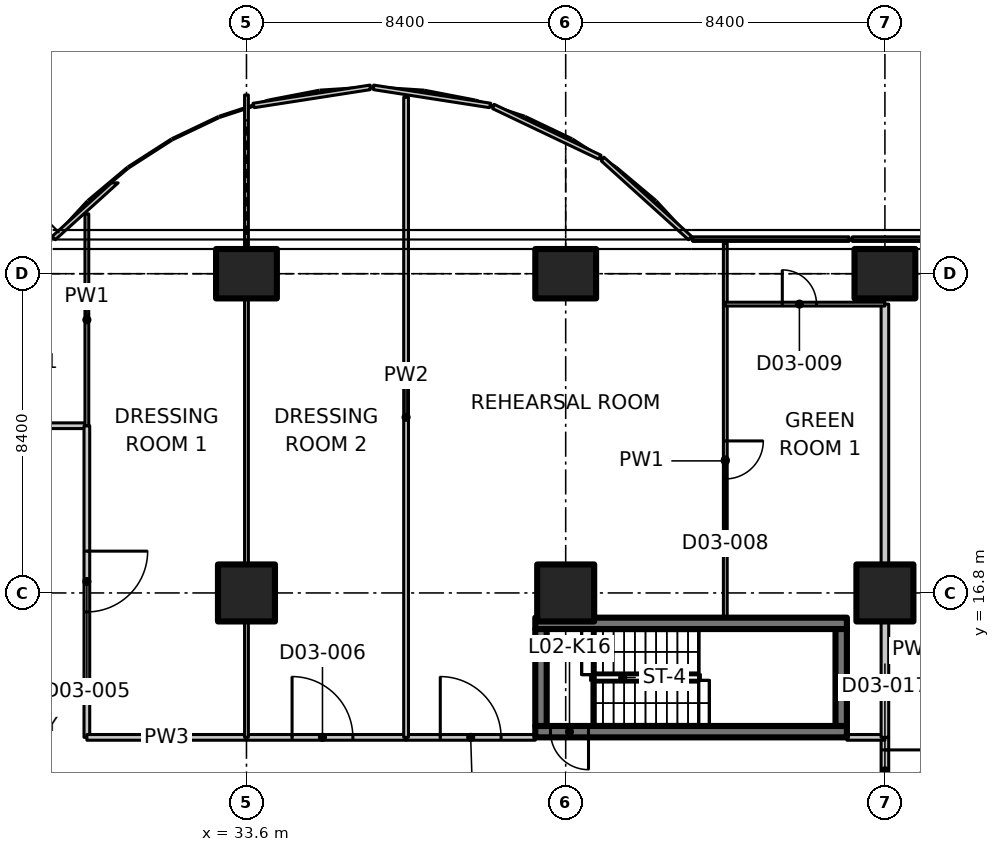
"""IFC4 building model, lengths in metres.
Left out: names, types, materials, properties, quantities, classifications, styles, units other than length and angle.
Written with IfcOpenShell. Run it as: python <this file> out.ifc"""

import sys

from ifc_helpers import new_model, si_unit, direction, frame, frame_2d, origin, origin_2d, place, context, subcontext, project, spatial, polyline, rectangle, outline, extrude, element, fill, save


model = new_model("IFC4")
c1 = context("Model", 3, precision=1e-05, world=origin(), true_north=direction((0.0, 1.0)))
c2 = subcontext(c1, "Body", "Model", "MODEL_VIEW")
j1 = project(units=[si_unit("LENGTHUNIT", "METRE"), si_unit("PLANEANGLEUNIT", "RADIAN")], contexts=[c1])
p1 = place(None, origin())
s1 = spatial("IfcSite", under=j1, at=p1, CompositionType="ELEMENT")
p2 = place(p1, origin())
s2 = spatial("IfcBuilding", under=s1, at=p2, CompositionType="ELEMENT")
p3 = place(p2, frame((0.0, 0.0, 12.5)))
s3 = spatial("IfcBuildingStorey", under=s2, at=p3, CompositionType="ELEMENT", Elevation=12.5)
p4 = place(p3, frame((33.6, 16.8, 0.0), z_axis=(0.0, 0.0, 1.0), x_axis=(1.0, 0.0, 0.0)))
e1 = element("IfcColumn", 1, at=p4, inside=s3, PredefinedType="COLUMN", context=c2, shape_type="SweptSolid", body=[
    extrude(rectangle(XDim=1.5, YDim=1.5, at=origin_2d()), origin(), (0.0, 0.0, 1.0), 7.25),
])
p5 = place(p3, frame((33.6, 25.2, 0.0), z_axis=(0.0, 0.0, 1.0), x_axis=(0.0, 1.0, 0.0)))
e2 = element("IfcColumn", 2, at=p5, inside=s3, PredefinedType="COLUMN", context=c2, shape_type="SweptSolid", body=[
    extrude(rectangle(XDim=1.3, YDim=1.6, at=origin_2d()), origin(), (0.0, 0.0, 1.0), 7.25),
])
p6 = place(p3, frame((42.0, 16.8, 0.0), z_axis=(0.0, 0.0, 1.0), x_axis=(1.0, 0.0, 0.0)))
e3 = element("IfcColumn", 3, at=p6, inside=s3, PredefinedType="COLUMN", context=c2, shape_type="SweptSolid", body=[
    extrude(rectangle(XDim=1.5, YDim=1.5, at=origin_2d()), origin(), (0.0, 0.0, 1.0), 7.25),
])
p7 = place(p3, frame((42.0, 25.2, 0.0), z_axis=(0.0, 0.0, 1.0), x_axis=(0.0, 1.0, 0.0)))
e4 = element("IfcColumn", 4, at=p7, inside=s3, PredefinedType="COLUMN", context=c2, shape_type="SweptSolid", body=[
    extrude(rectangle(XDim=1.3, YDim=1.6, at=origin_2d()), origin(), (0.0, 0.0, 1.0), 7.25),
])
p8 = place(p3, frame((50.4, 16.8, 0.0), z_axis=(0.0, 0.0, 1.0), x_axis=(1.0, 0.0, 0.0)))
e5 = element("IfcColumn", 5, at=p8, inside=s3, PredefinedType="COLUMN", context=c2, shape_type="SweptSolid", body=[
    extrude(rectangle(XDim=1.5, YDim=1.5, at=origin_2d()), origin(), (0.0, 0.0, 1.0), 7.25),
])
p9 = place(p3, frame((50.4, 25.2, 0.0), z_axis=(0.0, 0.0, 1.0), x_axis=(0.0, 1.0, 0.0)))
e6 = element("IfcColumn", 6, at=p9, inside=s3, PredefinedType="COLUMN", context=c2, shape_type="SweptSolid", body=[
    extrude(rectangle(XDim=1.3, YDim=1.6, at=origin_2d()), origin(), (0.0, 0.0, 1.0), 7.25),
])
p10 = place(p3, origin())
e7 = element("IfcWall", 7, at=p10, inside=s3, PredefinedType="SOLIDWALL", context=c2, shape_type="SweptSolid", body=[
    extrude(outline(polyline([(49.545, 26.17), (49.545, 26.05), (53.655, 26.05), (53.655, 26.17), (49.545, 26.17)])), origin(), (0.0, 0.0, 1.0), 7.5),
])
p11 = place(p3, origin())
e8 = element("IfcWall", 8, at=p11, inside=s3, PredefinedType="SOLIDWALL", context=c2, shape_type="SweptSolid", body=[
    extrude(outline(polyline([(45.345, 26.17), (45.345, 26.05), (49.455, 26.05), (49.455, 26.17), (45.345, 26.17)])), origin(), (0.0, 0.0, 1.0), 7.5),
])
p12 = place(p3, origin())
e9 = element("IfcWall", 9, at=p12, inside=s3, PredefinedType="SOLIDWALL", context=c2, shape_type="SweptSolid", body=[
    extrude(outline(polyline([(45.233, 26.093), (45.313, 26.182), (43.005, 28.267), (42.938, 28.167), (45.233, 26.093)])), origin(), (0.0, 0.0, 1.0), 7.5),
])
p13 = place(p3, origin())
e10 = element("IfcWall", 10, at=p13, inside=s3, PredefinedType="SOLIDWALL", context=c2, shape_type="SweptSolid", body=[
    extrude(outline(polyline([(42.863, 28.217), (42.93, 28.317), (40.115, 29.658), (40.079, 29.542), (42.863, 28.217)])), origin(), (0.0, 0.0, 1.0), 7.5),
])
p14 = place(p3, origin())
e11 = element("IfcWall", 11, at=p14, inside=s3, PredefinedType="SOLIDWALL", context=c2, shape_type="SweptSolid", body=[
    extrude(outline(polyline([(39.993, 29.569), (40.029, 29.685), (36.945, 30.164), (36.945, 30.042), (39.993, 29.569)])), origin(), (0.0, 0.0, 1.0), 7.5),
])
p15 = place(p3, origin())
e12 = element("IfcWall", 12, at=p15, inside=s3, PredefinedType="SOLIDWALL", context=c2, shape_type="SweptSolid", body=[
    extrude(outline(polyline([(36.855, 30.042), (36.855, 30.164), (33.771, 29.685), (33.807, 29.569), (36.855, 30.042)])), origin(), (0.0, 0.0, 1.0), 7.5),
])
p16 = place(p3, origin())
e13 = element("IfcWall", 13, at=p16, inside=s3, PredefinedType="SOLIDWALL", context=c2, shape_type="SweptSolid", body=[
    extrude(outline(polyline([(30.224, 27.59), (30.045, 27.59), (28.487, 26.182), (28.567, 26.093), (30.224, 27.59)])), origin(), (0.0, 0.0, 1.0), 7.5),
])
p17 = place(p3, frame((49.4, 13.15, 0.0), z_axis=(0.0, 0.0, 1.0), x_axis=(-1.0, 0.0, 0.0)))
e14 = element("IfcWall", 14, at=p17, inside=s3, PredefinedType="SHEAR", context=c2, shape_type="SweptSolid", body=[
    extrude(rectangle(XDim=8.2, YDim=0.3, at=frame_2d((4.1, 0.0))), origin(), (0.0, 0.0, 1.0), 7.25),
])
p18 = place(p17, frame((6.8, 0.0, 0.0)))
e15 = element("IfcOpeningElement", 15, at=p18, cuts=e14, PredefinedType="OPENING", context=c2, shape_type="SweptSolid", body=[
    extrude(rectangle(XDim=1.0, YDim=2.1, at=frame_2d((0.5, 1.05))), frame((0.0, 0.16, 0.0), z_axis=(0.0, -1.0, 0.0), x_axis=(1.0, 0.0, 0.0)), (0.0, 0.0, 1.0), 0.32),
])
p19 = place(p3, frame((41.2, 16.0, 0.0), z_axis=(0.0, 0.0, 1.0), x_axis=(1.0, 0.0, 0.0)))
e16 = element("IfcWall", 16, at=p19, inside=s3, PredefinedType="SHEAR", context=c2, shape_type="SweptSolid", body=[
    extrude(rectangle(XDim=8.2, YDim=0.3, at=frame_2d((4.1, 0.0))), origin(), (0.0, 0.0, 1.0), 7.25),
])
for number, where, z_axis, x_axis in (
    (17, (41.35, 13.3, 0.0), (0.0, 0.0, 1.0), (0.0, 1.0, 0.0)),
    (18, (49.25, 13.3, 0.0), (0.0, 0.0, 1.0), (0.0, 1.0, 0.0)),
):
    element("IfcWall", number, at=place(p3, frame(where, z_axis=z_axis, x_axis=x_axis)), inside=s3, PredefinedType="SHEAR", context=c2, shape_type="SweptSolid", body=[
        extrude(rectangle(XDim=2.55, YDim=0.3, at=frame_2d((1.275, 0.0))), origin(), (0.0, 0.0, 1.0), 7.25),
    ])
p20 = place(p3, frame((25.2, 21.2, 0.0), z_axis=(0.0, 0.0, 1.0), x_axis=(1.0, 0.0, 0.0)))
e19 = element("IfcWall", 19, at=p20, inside=s3, PredefinedType="PARTITIONING", context=c2, shape_type="SweptSolid", body=[
    extrude(rectangle(XDim=4.2, YDim=0.15, at=frame_2d((2.1, 0.0))), origin(), (0.0, 0.0, 1.0), 7.23),
])
p21 = place(p3, frame((29.4, 21.2, 0.0), z_axis=(0.0, 0.0, 1.0), x_axis=(0.0, -1.0, 0.0)))
e20 = element("IfcWall", 20, at=p21, inside=s3, PredefinedType="PARTITIONING", context=c2, shape_type="SweptSolid", body=[
    extrude(rectangle(XDim=8.2, YDim=0.15, at=frame_2d((4.1, 0.0))), origin(), (0.0, 0.0, 1.0), 7.23),
])
p22 = place(p21, frame((3.3, 0.0, 0.0)))
e21 = element("IfcOpeningElement", 21, at=p22, cuts=e20, PredefinedType="OPENING", context=c2, shape_type="SweptSolid", body=[
    extrude(rectangle(XDim=1.6, YDim=2.1, at=frame_2d((0.8, 1.05))), frame((0.0, 0.085, 0.0), z_axis=(0.0, -1.0, 0.0), x_axis=(1.0, 0.0, 0.0)), (0.0, 0.0, 1.0), 0.17),
])
p23 = place(p3, frame((29.4, 26.776, 0.0), z_axis=(0.0, 0.0, 1.0), x_axis=(0.0, -1.0, 0.0)))
e22 = element("IfcWall", 22, at=p23, inside=s3, PredefinedType="PARTITIONING", context=c2, shape_type="SweptSolid", body=[
    extrude(outline(polyline([(0.0, 0.0), (5.576, 0.0), (5.576, 7.23), (2.026, 7.23), (2.024, 6.88), (1.128, 6.88), (1.126, 7.23), (0.0, 7.23), (0.0, 0.0)])), frame((0.0, 0.05, 0.0), z_axis=(0.0, -1.0, 0.0), x_axis=(1.0, 0.0, 0.0)), (0.0, 0.0, 1.0), 0.1),
])
p24 = place(p3, frame((28.432, 31.168, 0.0), z_axis=(0.0, 0.0, 1.0), x_axis=(-0.541288698077, -0.840836812547, 0.0)))
e23 = element("IfcWall", 23, at=p24, inside=s3, PredefinedType="PARTITIONING", context=c2, shape_type="SweptSolid", body=[
    extrude(rectangle(XDim=0.325, YDim=0.15, at=frame_2d((0.163, 0.0))), origin(), (0.0, 0.0, 1.0), 7.23),
])
p25 = place(p3, frame((50.4, 13.0, 0.0), z_axis=(0.0, 0.0, 1.0), x_axis=(0.0, -1.0, 0.0)))
e24 = element("IfcWall", 24, at=p25, inside=s3, PredefinedType="PARTITIONING", context=c2, shape_type="SweptSolid", body=[
    extrude(rectangle(XDim=3.83, YDim=0.2, at=frame_2d((1.915, 0.0))), origin(), (0.0, 0.0, 1.0), 7.23),
])
p26 = place(p25, frame((2.43, 0.0, 0.0)))
e25 = element("IfcOpeningElement", 25, at=p26, cuts=e24, PredefinedType="OPENING", context=c2, shape_type="SweptSolid", body=[
    extrude(rectangle(XDim=1.1, YDim=2.1, at=frame_2d((0.55, 1.05))), frame((0.0, 0.11, 0.0), z_axis=(0.0, -1.0, 0.0), x_axis=(1.0, 0.0, 0.0)), (0.0, 0.0, 1.0), 0.22),
])
p27 = place(p25, frame((0.33, 0.0, 0.0)))
e26 = element("IfcOpeningElement", 26, at=p27, cuts=e24, PredefinedType="OPENING", context=c2, shape_type="SweptSolid", body=[
    extrude(rectangle(XDim=1.1, YDim=2.1, at=frame_2d((0.55, 1.05))), frame((0.0, 0.11, 0.0), z_axis=(0.0, -1.0, 0.0), x_axis=(1.0, 0.0, 0.0)), (0.0, 0.0, 1.0), 0.22),
])
p28 = place(p3, frame((29.4, 13.0, 0.0), z_axis=(0.0, 0.0, 1.0), x_axis=(1.0, 0.0, 0.0)))
e27 = element("IfcWall", 27, at=p28, inside=s3, PredefinedType="PARTITIONING", context=c2, shape_type="SweptSolid", body=[
    extrude(rectangle(XDim=4.2, YDim=0.15, at=frame_2d((2.1, 0.0))), origin(), (0.0, 0.0, 1.0), 7.23),
])
p29 = place(p3, frame((33.6, 13.0, 0.0), z_axis=(0.0, 0.0, 1.0), x_axis=(1.0, 0.0, 0.0)))
e28 = element("IfcWall", 28, at=p29, inside=s3, PredefinedType="PARTITIONING", context=c2, shape_type="SweptSolid", body=[
    extrude(rectangle(XDim=4.2, YDim=0.15, at=frame_2d((2.1, 0.0))), origin(), (0.0, 0.0, 1.0), 7.23),
])
p30 = place(p29, frame((1.2, 0.0, 0.0)))
e29 = element("IfcOpeningElement", 29, at=p30, cuts=e28, PredefinedType="OPENING", context=c2, shape_type="SweptSolid", body=[
    extrude(rectangle(XDim=1.6, YDim=2.1, at=frame_2d((0.8, 1.05))), frame((0.0, 0.085, 0.0), z_axis=(0.0, -1.0, 0.0), x_axis=(1.0, 0.0, 0.0)), (0.0, 0.0, 1.0), 0.17),
])
p31 = place(p3, frame((37.8, 13.0, 0.0), z_axis=(0.0, 0.0, 1.0), x_axis=(1.0, 0.0, 0.0)))
e30 = element("IfcWall", 30, at=p31, inside=s3, PredefinedType="PARTITIONING", context=c2, shape_type="SweptSolid", body=[
    extrude(rectangle(XDim=3.4, YDim=0.15, at=frame_2d((1.7, 0.0))), origin(), (0.0, 0.0, 1.0), 7.23),
])
p32 = place(p31, frame((0.9, 0.0, 0.0)))
e31 = element("IfcOpeningElement", 31, at=p32, cuts=e30, PredefinedType="OPENING", context=c2, shape_type="SweptSolid", body=[
    extrude(rectangle(XDim=1.6, YDim=2.1, at=frame_2d((0.8, 1.05))), frame((0.0, 0.085, 0.0), z_axis=(0.0, -1.0, 0.0), x_axis=(1.0, 0.0, 0.0)), (0.0, 0.0, 1.0), 0.17),
])
p33 = place(p3, frame((49.4, 13.0, 0.0), z_axis=(0.0, 0.0, 1.0), x_axis=(1.0, 0.0, 0.0)))
e32 = element("IfcWall", 32, at=p33, inside=s3, PredefinedType="PARTITIONING", context=c2, shape_type="SweptSolid", body=[
    extrude(rectangle(XDim=1.0, YDim=0.15, at=frame_2d((0.5, 0.0))), origin(), (0.0, 0.0, 1.0), 7.23),
])
p34 = place(p3, frame((50.4, 13.0, 0.0), z_axis=(0.0, 0.0, 1.0), x_axis=(0.0, 1.0, 0.0)))
e33 = element("IfcWall", 33, at=p34, inside=s3, PredefinedType="PARTITIONING", context=c2, shape_type="SweptSolid", body=[
    extrude(rectangle(XDim=3.03, YDim=0.2, at=frame_2d((1.515, 0.0))), origin(), (0.0, 0.0, 1.0), 7.23),
])
p35 = place(p3, frame((50.4, 17.57, 0.0), z_axis=(0.0, 0.0, 1.0), x_axis=(0.0, 1.0, 0.0)))
e34 = element("IfcWall", 34, at=p35, inside=s3, PredefinedType="PARTITIONING", context=c2, shape_type="SweptSolid", body=[
    extrude(rectangle(XDim=6.83, YDim=0.2, at=frame_2d((3.415, 0.0))), origin(), (0.0, 0.0, 1.0), 7.23),
])
p36 = place(p3, frame((33.6, 29.904, 0.0), z_axis=(0.0, 0.0, 1.0), x_axis=(0.0, -1.0, 0.0)))
e35 = element("IfcWall", 35, at=p36, inside=s3, PredefinedType="PARTITIONING", context=c2, shape_type="SweptSolid", body=[
    extrude(rectangle(XDim=4.033, YDim=0.1, at=frame_2d((2.017, 0.0))), origin(), (0.0, 0.0, 1.0), 6.88),
])
p37 = place(p3, frame((33.6, 24.53, 0.0), z_axis=(0.0, 0.0, 1.0), x_axis=(0.0, -1.0, 0.0)))
e36 = element("IfcWall", 36, at=p37, inside=s3, PredefinedType="PARTITIONING", context=c2, shape_type="SweptSolid", body=[
    extrude(rectangle(XDim=6.96, YDim=0.1, at=frame_2d((3.48, 0.0))), origin(), (0.0, 0.0, 1.0), 7.23),
])
p38 = place(p3, frame((33.6, 16.03, 0.0), z_axis=(0.0, 0.0, 1.0), x_axis=(0.0, -1.0, 0.0)))
e37 = element("IfcWall", 37, at=p38, inside=s3, PredefinedType="PARTITIONING", context=c2, shape_type="SweptSolid", body=[
    extrude(rectangle(XDim=3.03, YDim=0.1, at=frame_2d((1.515, 0.0))), origin(), (0.0, 0.0, 1.0), 7.23),
])
p39 = place(p3, frame((37.8, 29.844, 0.0), z_axis=(0.0, 0.0, 1.0), x_axis=(0.0, -1.0, 0.0)))
e38 = element("IfcWall", 38, at=p39, inside=s3, PredefinedType="PARTITIONING", context=c2, shape_type="SweptSolid", body=[
    extrude(outline(polyline([(0.0, 0.0), (16.844, 0.0), (16.844, 7.23), (5.094, 7.23), (5.092, 6.88), (4.196, 6.88), (4.194, 7.23), (0.0, 7.23), (0.0, 0.0)])), frame((0.0, 0.062, 0.0), z_axis=(0.0, -1.0, 0.0), x_axis=(1.0, 0.0, 0.0)), (0.0, 0.0, 1.0), 0.125),
])
p40 = place(p3, frame((46.2, 24.4, 0.0), z_axis=(0.0, 0.0, 1.0), x_axis=(0.0, -1.0, 0.0)))
e39 = element("IfcWall", 39, at=p40, inside=s3, PredefinedType="PARTITIONING", context=c2, shape_type="SweptSolid", body=[
    extrude(rectangle(XDim=8.25, YDim=0.1, at=frame_2d((4.125, 0.0))), origin(), (0.0, 0.0, 1.0), 7.23),
])
p41 = place(p40, frame((3.6, 0.0, 0.0)))
e40 = element("IfcOpeningElement", 40, at=p41, cuts=e39, PredefinedType="OPENING", context=c2, shape_type="SweptSolid", body=[
    extrude(rectangle(XDim=1.0, YDim=2.1, at=frame_2d((0.5, 1.05))), frame((0.0, 0.06, 0.0), z_axis=(0.0, -1.0, 0.0), x_axis=(1.0, 0.0, 0.0)), (0.0, 0.0, 1.0), 0.12),
])
p42 = place(p3, frame((46.2, 25.998, 0.0), z_axis=(0.0, 0.0, 1.0), x_axis=(0.0, -1.0, 0.0)))
e41 = element("IfcWall", 41, at=p42, inside=s3, PredefinedType="PARTITIONING", context=c2, shape_type="SweptSolid", body=[
    extrude(rectangle(XDim=1.598, YDim=0.1, at=frame_2d((0.799, 0.0))), origin(), (0.0, 0.0, 1.0), 6.88),
])
p43 = place(p3, frame((46.2, 24.4, 0.0), z_axis=(0.0, 0.0, 1.0), x_axis=(1.0, 0.0, 0.0)))
e42 = element("IfcWall", 42, at=p43, inside=s3, PredefinedType="PARTITIONING", context=c2, shape_type="SweptSolid", body=[
    extrude(rectangle(XDim=4.2, YDim=0.1, at=frame_2d((2.1, 0.0))), origin(), (0.0, 0.0, 1.0), 7.23),
])
p44 = place(p43, frame((1.5, 0.0, 0.0)))
e43 = element("IfcOpeningElement", 43, at=p44, cuts=e42, PredefinedType="OPENING", context=c2, shape_type="SweptSolid", body=[
    extrude(rectangle(XDim=0.9, YDim=2.1, at=frame_2d((0.45, 1.05))), frame((0.0, 0.06, 0.0), z_axis=(0.0, -1.0, 0.0), x_axis=(1.0, 0.0, 0.0)), (0.0, 0.0, 1.0), 0.12),
])
p45 = place(p18, origin())
e44 = element("IfcDoor", 44, at=p45, inside=s3, OperationType="SINGLE_SWING_RIGHT", PredefinedType="DOOR", context=c2, shape_type="SweptSolid", body=[
    extrude(rectangle(XDim=1.0, YDim=2.1, at=frame_2d((0.5, 1.05))), frame((0.0, 0.025, 0.0), z_axis=(0.0, -1.0, 0.0), x_axis=(1.0, 0.0, 0.0)), (0.0, 0.0, 1.0), 0.05),
])
fill(e15, e44)
p46 = place(p22, origin())
e45 = element("IfcDoor", 45, at=p46, inside=s3, OperationType="DOUBLE_DOOR_SINGLE_SWING", PredefinedType="DOOR", context=c2, shape_type="SweptSolid", body=[
    extrude(rectangle(XDim=1.6, YDim=2.1, at=frame_2d((0.8, 1.05))), frame((0.0, 0.025, 0.0), z_axis=(0.0, -1.0, 0.0), x_axis=(1.0, 0.0, 0.0)), (0.0, 0.0, 1.0), 0.05),
])
fill(e21, e45)
p47 = place(p30, origin())
e46 = element("IfcDoor", 46, at=p47, inside=s3, OperationType="DOUBLE_DOOR_SINGLE_SWING", PredefinedType="DOOR", context=c2, shape_type="SweptSolid", body=[
    extrude(rectangle(XDim=1.6, YDim=2.1, at=frame_2d((0.8, 1.05))), frame((0.0, 0.025, 0.0), z_axis=(0.0, -1.0, 0.0), x_axis=(1.0, 0.0, 0.0)), (0.0, 0.0, 1.0), 0.05),
])
fill(e29, e46)
p48 = place(p32, origin())
e47 = element("IfcDoor", 47, at=p48, inside=s3, OperationType="DOUBLE_DOOR_SINGLE_SWING", PredefinedType="DOOR", context=c2, shape_type="SweptSolid", body=[
    extrude(rectangle(XDim=1.6, YDim=2.1, at=frame_2d((0.8, 1.05))), frame((0.0, 0.025, 0.0), z_axis=(0.0, -1.0, 0.0), x_axis=(1.0, 0.0, 0.0)), (0.0, 0.0, 1.0), 0.05),
])
fill(e31, e47)
p49 = place(p41, origin())
e48 = element("IfcDoor", 48, at=p49, inside=s3, OperationType="SINGLE_SWING_LEFT", PredefinedType="DOOR", context=c2, shape_type="SweptSolid", body=[
    extrude(rectangle(XDim=1.0, YDim=2.1, at=frame_2d((0.5, 1.05))), frame((0.0, 0.025, 0.0), z_axis=(0.0, -1.0, 0.0), x_axis=(1.0, 0.0, 0.0)), (0.0, 0.0, 1.0), 0.05),
])
fill(e40, e48)
p50 = place(p44, origin())
e49 = element("IfcDoor", 49, at=p50, inside=s3, OperationType="SINGLE_SWING_LEFT", PredefinedType="DOOR", context=c2, shape_type="SweptSolid", body=[
    extrude(rectangle(XDim=0.9, YDim=2.1, at=frame_2d((0.45, 1.05))), frame((0.0, 0.025, 0.0), z_axis=(0.0, -1.0, 0.0), x_axis=(1.0, 0.0, 0.0)), (0.0, 0.0, 1.0), 0.05),
])
fill(e43, e49)
p51 = place(p27, origin())
e50 = element("IfcDoor", 50, at=p51, inside=s3, OperationType="SINGLE_SWING_RIGHT", PredefinedType="DOOR", context=c2, shape_type="SweptSolid", body=[
    extrude(rectangle(XDim=1.1, YDim=2.1, at=frame_2d((0.55, 1.05))), frame((0.0, 0.025, 0.0), z_axis=(0.0, -1.0, 0.0), x_axis=(1.0, 0.0, 0.0)), (0.0, 0.0, 1.0), 0.05),
])
fill(e26, e50)
save(model, sys.argv[1])
